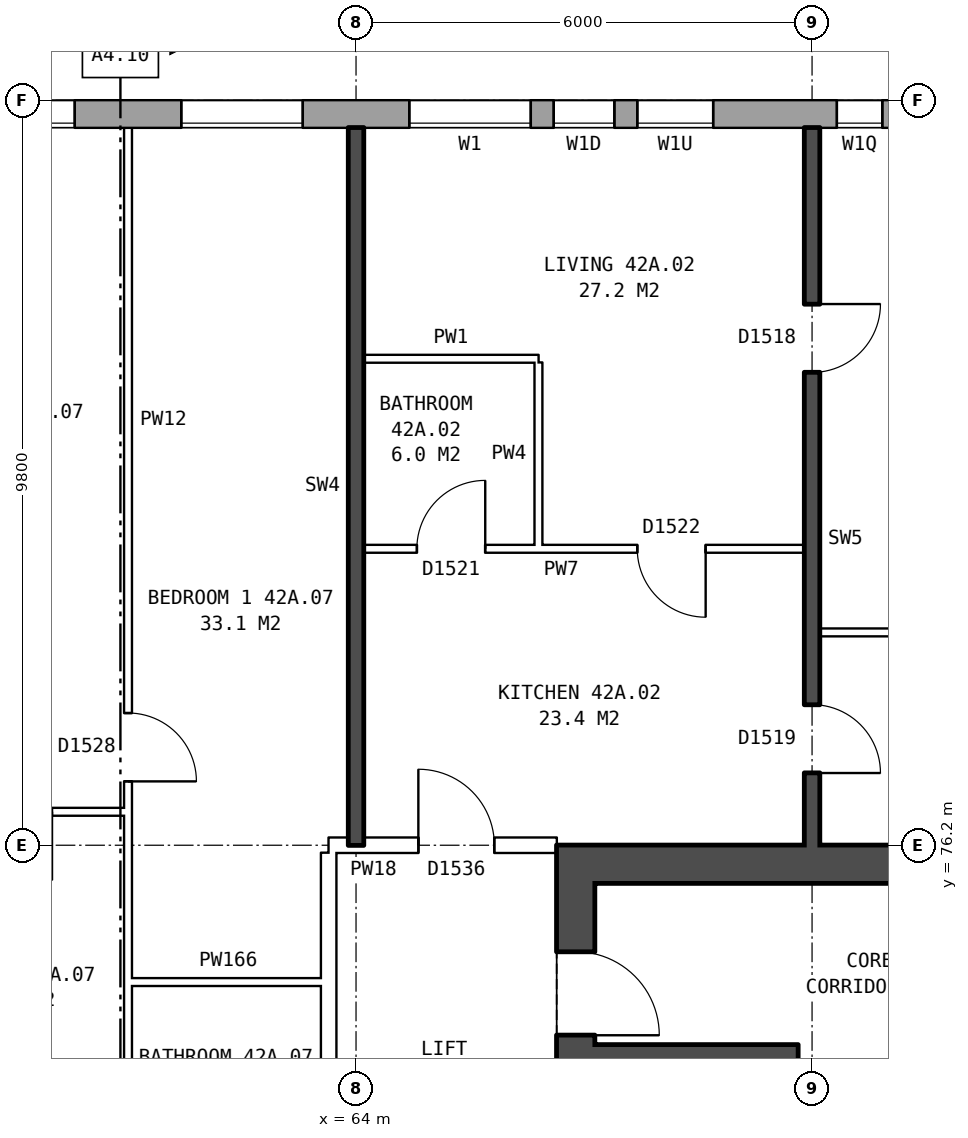
"""IFC4 building model, lengths in metres.
Left out: names, types, materials, properties, quantities, classifications, styles, units other than length and angle.
Written with IfcOpenShell. Run it as: python <this file> out.ifc"""

import sys

from ifc_helpers import new_model, si_unit, direction, frame, frame_2d, origin, place, context, subcontext, project, spatial, rectangle, extrude, element, fill, save


model = new_model("IFC4")
c1 = context("Model", 3, precision=1e-05, world=origin(), true_north=direction((0.0, 1.0)))
c2 = subcontext(c1, "Body", "Model", "MODEL_VIEW")
j1 = project(units=[si_unit("LENGTHUNIT", "METRE"), si_unit("PLANEANGLEUNIT", "RADIAN")], contexts=[c1])
p1 = place(None, origin())
s1 = spatial("IfcSite", under=j1, at=p1, CompositionType="ELEMENT")
p2 = place(p1, origin())
s2 = spatial("IfcBuilding", under=s1, at=p2, CompositionType="ELEMENT")
p3 = place(p2, frame((0.0, 0.0, 151.6)))
s3 = spatial("IfcBuildingStorey", under=s2, at=p3, CompositionType="ELEMENT", Elevation=151.6)
p4 = place(p3, frame((72.925, 85.82, 0.0), z_axis=(0.0, 0.0, 1.0), x_axis=(-1.0, 0.0, 0.0)))
e1 = element("IfcWall", 1, at=p4, inside=s3, PredefinedType="STANDARD", context=c2, shape_type="SweptSolid", body=[
    extrude(rectangle(XDim=41.351, YDim=0.36, at=frame_2d((20.675, 0.0))), origin(), (0.0, 0.0, 1.0), 2.85),
])
p5 = place(p4, frame((0.3, 0.0, 0.8)))
e2 = element("IfcOpeningElement", 2, at=p5, cuts=e1, PredefinedType="OPENING", context=c2, shape_type="SweptSolid", body=[
    extrude(rectangle(XDim=1.4, YDim=1.8, at=frame_2d((0.7, 0.9))), frame((0.0, 0.19, 0.0), z_axis=(0.0, -1.0, 0.0), x_axis=(1.0, 0.0, 0.0)), (0.0, 0.0, 1.0), 0.38),
])
p6 = place(p4, frame((4.225, 0.0, 0.8)))
e3 = element("IfcOpeningElement", 3, at=p6, cuts=e1, PredefinedType="OPENING", context=c2, shape_type="SweptSolid", body=[
    extrude(rectangle(XDim=1.0, YDim=0.9, at=frame_2d((0.5, 0.45))), frame((0.0, 0.19, 0.0), z_axis=(0.0, -1.0, 0.0), x_axis=(1.0, 0.0, 0.0)), (0.0, 0.0, 1.0), 0.38),
])
p7 = place(p4, frame((6.625, 0.0, 0.8)))
e4 = element("IfcOpeningElement", 4, at=p7, cuts=e1, PredefinedType="OPENING", context=c2, shape_type="SweptSolid", body=[
    extrude(rectangle(XDim=1.6, YDim=1.8, at=frame_2d((0.8, 0.9))), frame((0.0, 0.19, 0.0), z_axis=(0.0, -1.0, 0.0), x_axis=(1.0, 0.0, 0.0)), (0.0, 0.0, 1.0), 0.38),
])
p8 = place(p4, frame((9.625, 0.0, 0.8)))
e5 = element("IfcOpeningElement", 5, at=p8, cuts=e1, PredefinedType="OPENING", context=c2, shape_type="SweptSolid", body=[
    extrude(rectangle(XDim=1.6, YDim=1.8, at=frame_2d((0.8, 0.9))), frame((0.0, 0.19, 0.0), z_axis=(0.0, -1.0, 0.0), x_axis=(1.0, 0.0, 0.0)), (0.0, 0.0, 1.0), 0.38),
])
p9 = place(p4, frame((12.625, 0.0, 0.8)))
e6 = element("IfcOpeningElement", 6, at=p9, cuts=e1, PredefinedType="OPENING", context=c2, shape_type="SweptSolid", body=[
    extrude(rectangle(XDim=1.6, YDim=1.8, at=frame_2d((0.8, 0.9))), frame((0.0, 0.19, 0.0), z_axis=(0.0, -1.0, 0.0), x_axis=(1.0, 0.0, 0.0)), (0.0, 0.0, 1.0), 0.38),
])
p10 = place(p4, frame((15.625, 0.0, 0.8)))
e7 = element("IfcOpeningElement", 7, at=p10, cuts=e1, PredefinedType="OPENING", context=c2, shape_type="SweptSolid", body=[
    extrude(rectangle(XDim=1.6, YDim=1.8, at=frame_2d((0.8, 0.9))), frame((0.0, 0.19, 0.0), z_axis=(0.0, -1.0, 0.0), x_axis=(1.0, 0.0, 0.0)), (0.0, 0.0, 1.0), 0.38),
])
p11 = place(p4, frame((18.625, 0.0, 0.8)))
e8 = element("IfcOpeningElement", 8, at=p11, cuts=e1, PredefinedType="OPENING", context=c2, shape_type="SweptSolid", body=[
    extrude(rectangle(XDim=1.6, YDim=1.8, at=frame_2d((0.8, 0.9))), frame((0.0, 0.19, 0.0), z_axis=(0.0, -1.0, 0.0), x_axis=(1.0, 0.0, 0.0)), (0.0, 0.0, 1.0), 0.38),
])
p12 = place(p4, frame((21.625, 0.0, 0.8)))
e9 = element("IfcOpeningElement", 9, at=p12, cuts=e1, PredefinedType="OPENING", context=c2, shape_type="SweptSolid", body=[
    extrude(rectangle(XDim=1.6, YDim=1.8, at=frame_2d((0.8, 0.9))), frame((0.0, 0.19, 0.0), z_axis=(0.0, -1.0, 0.0), x_axis=(1.0, 0.0, 0.0)), (0.0, 0.0, 1.0), 0.38),
])
p13 = place(p4, frame((24.625, 0.0, 0.8)))
e10 = element("IfcOpeningElement", 10, at=p13, cuts=e1, PredefinedType="OPENING", context=c2, shape_type="SweptSolid", body=[
    extrude(rectangle(XDim=1.6, YDim=1.8, at=frame_2d((0.8, 0.9))), frame((0.0, 0.19, 0.0), z_axis=(0.0, -1.0, 0.0), x_axis=(1.0, 0.0, 0.0)), (0.0, 0.0, 1.0), 0.38),
])
p14 = place(p4, frame((27.625, 0.0, 0.8)))
e11 = element("IfcOpeningElement", 11, at=p14, cuts=e1, PredefinedType="OPENING", context=c2, shape_type="SweptSolid", body=[
    extrude(rectangle(XDim=1.6, YDim=1.8, at=frame_2d((0.8, 0.9))), frame((0.0, 0.19, 0.0), z_axis=(0.0, -1.0, 0.0), x_axis=(1.0, 0.0, 0.0)), (0.0, 0.0, 1.0), 0.38),
])
p15 = place(p4, frame((30.625, 0.0, 0.8)))
e12 = element("IfcOpeningElement", 12, at=p15, cuts=e1, PredefinedType="OPENING", context=c2, shape_type="SweptSolid", body=[
    extrude(rectangle(XDim=1.6, YDim=1.8, at=frame_2d((0.8, 0.9))), frame((0.0, 0.19, 0.0), z_axis=(0.0, -1.0, 0.0), x_axis=(1.0, 0.0, 0.0)), (0.0, 0.0, 1.0), 0.38),
])
p16 = place(p4, frame((33.625, 0.0, 0.8)))
e13 = element("IfcOpeningElement", 13, at=p16, cuts=e1, PredefinedType="OPENING", context=c2, shape_type="SweptSolid", body=[
    extrude(rectangle(XDim=1.6, YDim=1.8, at=frame_2d((0.8, 0.9))), frame((0.0, 0.19, 0.0), z_axis=(0.0, -1.0, 0.0), x_axis=(1.0, 0.0, 0.0)), (0.0, 0.0, 1.0), 0.38),
])
p17 = place(p4, frame((35.525, 0.0, 0.8)))
e14 = element("IfcOpeningElement", 14, at=p17, cuts=e1, PredefinedType="OPENING", context=c2, shape_type="SweptSolid", body=[
    extrude(rectangle(XDim=1.2, YDim=1.2, at=frame_2d((0.6, 0.6))), frame((0.0, 0.19, 0.0), z_axis=(0.0, -1.0, 0.0), x_axis=(1.0, 0.0, 0.0)), (0.0, 0.0, 1.0), 0.38),
])
p18 = place(p4, frame((2.0, 0.0, 1.4)))
e15 = element("IfcOpeningElement", 15, at=p18, cuts=e1, PredefinedType="OPENING", context=c2, shape_type="SweptSolid", body=[
    extrude(rectangle(XDim=0.6, YDim=1.2, at=frame_2d((0.3, 0.6))), frame((0.0, 0.19, 0.0), z_axis=(0.0, -1.0, 0.0), x_axis=(1.0, 0.0, 0.0)), (0.0, 0.0, 1.0), 0.38),
])
p19 = place(p4, frame((5.525, 0.0, 0.8)))
e16 = element("IfcOpeningElement", 16, at=p19, cuts=e1, PredefinedType="OPENING", context=c2, shape_type="SweptSolid", body=[
    extrude(rectangle(XDim=0.8, YDim=1.8, at=frame_2d((0.4, 0.9))), frame((0.0, 0.19, 0.0), z_axis=(0.0, -1.0, 0.0), x_axis=(1.0, 0.0, 0.0)), (0.0, 0.0, 1.0), 0.38),
])
p20 = place(p3, frame((66.89, 63.8, 0.0), z_axis=(0.0, 0.0, 1.0), x_axis=(0.0, 1.0, 0.0)))
e17 = element("IfcWall", 17, at=p20, inside=s3, PredefinedType="SHEAR", context=c2, shape_type="SweptSolid", body=[
    extrude(rectangle(XDim=12.4, YDim=0.5, at=frame_2d((6.2, 0.0))), origin(), (0.0, 0.0, 1.0), 2.85),
])
p21 = place(p20, frame((1.325, 0.0, 0.0)))
e18 = element("IfcOpeningElement", 18, at=p21, cuts=e17, PredefinedType="OPENING", context=c2, shape_type="SweptSolid", body=[
    extrude(rectangle(XDim=1.1, YDim=2.1, at=frame_2d((0.55, 1.05))), frame((0.0, 0.26, 0.0), z_axis=(0.0, -1.0, 0.0), x_axis=(1.0, 0.0, 0.0)), (0.0, 0.0, 1.0), 0.52),
])
p22 = place(p20, frame((3.6, 0.0, 0.0)))
e19 = element("IfcOpeningElement", 19, at=p22, cuts=e17, PredefinedType="OPENING", context=c2, shape_type="SweptSolid", body=[
    extrude(rectangle(XDim=1.1, YDim=2.1, at=frame_2d((0.55, 1.05))), frame((0.0, 0.26, 0.0), z_axis=(0.0, -1.0, 0.0), x_axis=(1.0, 0.0, 0.0)), (0.0, 0.0, 1.0), 0.52),
])
p23 = place(p20, frame((5.8, 0.0, 0.0)))
e20 = element("IfcOpeningElement", 20, at=p23, cuts=e17, PredefinedType="OPENING", context=c2, shape_type="SweptSolid", body=[
    extrude(rectangle(XDim=1.1, YDim=2.1, at=frame_2d((0.55, 1.05))), frame((0.0, 0.26, 0.0), z_axis=(0.0, -1.0, 0.0), x_axis=(1.0, 0.0, 0.0)), (0.0, 0.0, 1.0), 0.52),
])
p24 = place(p20, frame((8.0, 0.0, 0.0)))
e21 = element("IfcOpeningElement", 21, at=p24, cuts=e17, PredefinedType="OPENING", context=c2, shape_type="SweptSolid", body=[
    extrude(rectangle(XDim=1.1, YDim=2.1, at=frame_2d((0.55, 1.05))), frame((0.0, 0.26, 0.0), z_axis=(0.0, -1.0, 0.0), x_axis=(1.0, 0.0, 0.0)), (0.0, 0.0, 1.0), 0.52),
])
p25 = place(p20, frame((9.9, 0.0, 0.0)))
e22 = element("IfcOpeningElement", 22, at=p25, cuts=e17, PredefinedType="OPENING", context=c2, shape_type="SweptSolid", body=[
    extrude(rectangle(XDim=1.1, YDim=2.1, at=frame_2d((0.55, 1.05))), frame((0.0, 0.26, 0.0), z_axis=(0.0, -1.0, 0.0), x_axis=(1.0, 0.0, 0.0)), (0.0, 0.0, 1.0), 0.52),
])
p26 = place(p3, frame((67.14, 75.95, 0.0), z_axis=(0.0, 0.0, 1.0), x_axis=(1.0, 0.0, 0.0)))
e23 = element("IfcWall", 23, at=p26, inside=s3, PredefinedType="SHEAR", context=c2, shape_type="SweptSolid", body=[
    extrude(rectangle(XDim=8.0, YDim=0.5, at=frame_2d((4.0, 0.0))), origin(), (0.0, 0.0, 1.0), 2.85),
])
p27 = place(p3, frame((67.14, 73.45, 0.0), z_axis=(0.0, 0.0, 1.0), x_axis=(1.0, 0.0, 0.0)))
e24 = element("IfcWall", 24, at=p27, inside=s3, PredefinedType="SHEAR", context=c2, shape_type="SweptSolid", body=[
    extrude(rectangle(XDim=2.425, YDim=0.25, at=frame_2d((1.212, 0.0))), origin(), (0.0, 0.0, 1.0), 2.85),
])
p28 = place(p3, frame((69.69, 66.975, 0.0), z_axis=(0.0, 0.0, 1.0), x_axis=(0.0, 1.0, 0.0)))
e25 = element("IfcWall", 25, at=p28, inside=s3, PredefinedType="SHEAR", context=c2, shape_type="SweptSolid", body=[
    extrude(rectangle(XDim=6.6, YDim=0.25, at=frame_2d((3.3, 0.0))), origin(), (0.0, 0.0, 1.0), 2.85),
])
p29 = place(p3, frame((63.64, 63.9, 0.0), z_axis=(0.0, 0.0, 1.0), x_axis=(0.0, 1.0, 0.0)))
e26 = element("IfcWall", 26, at=p29, inside=s3, PredefinedType="PARTITIONING", context=c2, shape_type="SweptSolid", body=[
    extrude(rectangle(XDim=12.2, YDim=0.2, at=frame_2d((6.1, 0.0))), origin(), (0.0, 0.0, 1.0), 2.85),
])
p30 = place(p29, frame((5.1, 0.0, 0.0)))
e27 = element("IfcOpeningElement", 27, at=p30, cuts=e26, PredefinedType="OPENING", context=c2, shape_type="SweptSolid", body=[
    extrude(rectangle(XDim=2.0, YDim=2.1, at=frame_2d((1.0, 1.05))), frame((0.0, 0.11, 0.0), z_axis=(0.0, -1.0, 0.0), x_axis=(1.0, 0.0, 0.0)), (0.0, 0.0, 1.0), 0.22),
])
p31 = place(p3, frame((61.0, 74.4, 0.0), z_axis=(0.0, 0.0, 1.0), x_axis=(1.0, 0.0, 0.0)))
e28 = element("IfcWall", 28, at=p31, inside=s3, PredefinedType="PARTITIONING", context=c2, shape_type="SweptSolid", body=[
    extrude(rectangle(XDim=2.64, YDim=0.1, at=frame_2d((1.32, 0.0))), origin(), (0.0, 0.0, 1.0), 2.85),
])
p32 = place(p3, frame((63.64, 76.2, 0.0), z_axis=(0.0, 0.0, 1.0), x_axis=(1.0, 0.0, 0.0)))
e29 = element("IfcWall", 29, at=p32, inside=s3, PredefinedType="PARTITIONING", context=c2, shape_type="SweptSolid", body=[
    extrude(rectangle(XDim=3.0, YDim=0.2, at=frame_2d((1.5, 0.0))), origin(), (0.0, 0.0, 1.0), 2.85),
])
p33 = place(p32, frame((1.18, 0.0, 0.0)))
e30 = element("IfcOpeningElement", 30, at=p33, cuts=e29, PredefinedType="OPENING", context=c2, shape_type="SweptSolid", body=[
    extrude(rectangle(XDim=1.0, YDim=2.1, at=frame_2d((0.5, 1.05))), frame((0.0, 0.11, 0.0), z_axis=(0.0, -1.0, 0.0), x_axis=(1.0, 0.0, 0.0)), (0.0, 0.0, 1.0), 0.22),
])
p34 = place(p3, frame((58.1, 76.64, 0.0), z_axis=(0.0, 0.0, 1.0), x_axis=(1.0, 0.0, 0.0)))
e31 = element("IfcWall", 31, at=p34, inside=s3, PredefinedType="PARTITIONING", context=c2, shape_type="SweptSolid", body=[
    extrude(rectangle(XDim=2.9, YDim=0.1, at=frame_2d((1.45, 0.0))), origin(), (0.0, 0.0, 1.0), 2.85),
])
p35 = place(p34, frame((1.0, 0.0, 0.0)))
e32 = element("IfcOpeningElement", 32, at=p35, cuts=e31, PredefinedType="OPENING", context=c2, shape_type="SweptSolid", body=[
    extrude(rectangle(XDim=0.9, YDim=2.1, at=frame_2d((0.45, 1.05))), frame((0.0, 0.06, 0.0), z_axis=(0.0, -1.0, 0.0), x_axis=(1.0, 0.0, 0.0)), (0.0, 0.0, 1.0), 0.12),
])
p36 = place(p3, frame((70.1, 79.0, 0.0), z_axis=(0.0, 0.0, 1.0), x_axis=(1.0, 0.0, 0.0)))
e33 = element("IfcWall", 33, at=p36, inside=s3, PredefinedType="PARTITIONING", context=c2, shape_type="SweptSolid", body=[
    extrude(rectangle(XDim=5.54, YDim=0.1, at=frame_2d((2.77, 0.0))), origin(), (0.0, 0.0, 1.0), 2.85),
])
p37 = place(p3, frame((64.1, 80.1, 0.0), z_axis=(0.0, 0.0, 1.0), x_axis=(1.0, 0.0, 0.0)))
e34 = element("IfcWall", 34, at=p37, inside=s3, PredefinedType="PARTITIONING", context=c2, shape_type="SweptSolid", body=[
    extrude(rectangle(XDim=5.8, YDim=0.1, at=frame_2d((2.9, 0.0))), origin(), (0.0, 0.0, 1.0), 2.85),
])
p38 = place(p37, frame((3.6, 0.0, 0.0)))
e35 = element("IfcOpeningElement", 35, at=p38, cuts=e34, PredefinedType="OPENING", context=c2, shape_type="SweptSolid", body=[
    extrude(rectangle(XDim=0.9, YDim=2.1, at=frame_2d((0.45, 1.05))), frame((0.0, 0.06, 0.0), z_axis=(0.0, -1.0, 0.0), x_axis=(1.0, 0.0, 0.0)), (0.0, 0.0, 1.0), 0.12),
])
p39 = place(p37, frame((0.7, 0.0, 0.0)))
e36 = element("IfcOpeningElement", 36, at=p39, cuts=e34, PredefinedType="OPENING", context=c2, shape_type="SweptSolid", body=[
    extrude(rectangle(XDim=0.9, YDim=2.1, at=frame_2d((0.45, 1.05))), frame((0.0, 0.06, 0.0), z_axis=(0.0, -1.0, 0.0), x_axis=(1.0, 0.0, 0.0)), (0.0, 0.0, 1.0), 0.12),
])
p40 = place(p3, frame((64.1, 82.6, 0.0), z_axis=(0.0, 0.0, 1.0), x_axis=(1.0, 0.0, 0.0)))
e37 = element("IfcWall", 37, at=p40, inside=s3, PredefinedType="PARTITIONING", context=c2, shape_type="SweptSolid", body=[
    extrude(rectangle(XDim=2.3, YDim=0.1, at=frame_2d((1.15, 0.0))), origin(), (0.0, 0.0, 1.0), 2.85),
])
p41 = place(p3, frame((61.0, 71.3, 0.0), z_axis=(0.0, 0.0, 1.0), x_axis=(0.0, 1.0, 0.0)))
e38 = element("IfcWall", 38, at=p41, inside=s3, PredefinedType="PARTITIONING", context=c2, shape_type="SweptSolid", body=[
    extrude(rectangle(XDim=14.34, YDim=0.1, at=frame_2d((7.17, 0.0))), origin(), (0.0, 0.0, 1.0), 2.85),
])
p42 = place(p41, frame((5.74, 0.0, 0.0)))
e39 = element("IfcOpeningElement", 39, at=p42, cuts=e38, PredefinedType="OPENING", context=c2, shape_type="SweptSolid", body=[
    extrude(rectangle(XDim=0.9, YDim=2.1, at=frame_2d((0.45, 1.05))), frame((0.0, 0.06, 0.0), z_axis=(0.0, -1.0, 0.0), x_axis=(1.0, 0.0, 0.0)), (0.0, 0.0, 1.0), 0.12),
])
p43 = place(p41, frame((0.4, 0.0, 0.0)))
e40 = element("IfcOpeningElement", 40, at=p43, cuts=e38, PredefinedType="OPENING", context=c2, shape_type="SweptSolid", body=[
    extrude(rectangle(XDim=0.9, YDim=2.1, at=frame_2d((0.45, 1.05))), frame((0.0, 0.06, 0.0), z_axis=(0.0, -1.0, 0.0), x_axis=(1.0, 0.0, 0.0)), (0.0, 0.0, 1.0), 0.12),
])
p44 = place(p3, frame((64.0, 76.2, 0.0), z_axis=(0.0, 0.0, 1.0), x_axis=(0.0, 1.0, 0.0)))
e41 = element("IfcWall", 41, at=p44, inside=s3, PredefinedType="SOLIDWALL", context=c2, shape_type="SweptSolid", body=[
    extrude(rectangle(XDim=9.44, YDim=0.2, at=frame_2d((4.72, 0.0))), origin(), (0.0, 0.0, 1.0), 2.85),
])
p45 = place(p3, frame((66.4, 80.15, 0.0), z_axis=(0.0, 0.0, 1.0), x_axis=(0.0, 1.0, 0.0)))
e42 = element("IfcWall", 42, at=p45, inside=s3, PredefinedType="PARTITIONING", context=c2, shape_type="SweptSolid", body=[
    extrude(rectangle(XDim=2.4, YDim=0.1, at=frame_2d((1.2, 0.0))), origin(), (0.0, 0.0, 1.0), 2.85),
])
p46 = place(p3, frame((70.0, 76.2, 0.0), z_axis=(0.0, 0.0, 1.0), x_axis=(0.0, 1.0, 0.0)))
e43 = element("IfcWall", 43, at=p46, inside=s3, PredefinedType="SOLIDWALL", context=c2, shape_type="SweptSolid", body=[
    extrude(rectangle(XDim=9.44, YDim=0.2, at=frame_2d((4.72, 0.0))), origin(), (0.0, 0.0, 1.0), 2.85),
])
p47 = place(p46, frame((6.22, 0.0, 0.0)))
e44 = element("IfcOpeningElement", 44, at=p47, cuts=e43, PredefinedType="OPENING", context=c2, shape_type="SweptSolid", body=[
    extrude(rectangle(XDim=0.9, YDim=2.1, at=frame_2d((0.45, 1.05))), frame((0.0, 0.11, 0.0), z_axis=(0.0, -1.0, 0.0), x_axis=(1.0, 0.0, 0.0)), (0.0, 0.0, 1.0), 0.22),
])
p48 = place(p46, frame((0.95, 0.0, 0.0)))
e45 = element("IfcOpeningElement", 45, at=p48, cuts=e43, PredefinedType="OPENING", context=c2, shape_type="SweptSolid", body=[
    extrude(rectangle(XDim=0.9, YDim=2.1, at=frame_2d((0.45, 1.05))), frame((0.0, 0.11, 0.0), z_axis=(0.0, -1.0, 0.0), x_axis=(1.0, 0.0, 0.0)), (0.0, 0.0, 1.0), 0.22),
])
p49 = place(p6, origin())
e46 = element("IfcWindow", 46, at=p49, inside=s3, PartitioningType="SINGLE_PANEL", PredefinedType="WINDOW", context=c2, shape_type="SweptSolid", body=[
    extrude(rectangle(XDim=1.0, YDim=0.9, at=frame_2d((0.5, 0.45))), frame((0.0, 0.15, 0.0), z_axis=(0.0, -1.0, 0.0), x_axis=(1.0, 0.0, 0.0)), (0.0, 0.0, 1.0), 0.06),
])
fill(e3, e46)
p50 = place(p7, origin())
e47 = element("IfcWindow", 47, at=p50, inside=s3, PartitioningType="SINGLE_PANEL", PredefinedType="WINDOW", context=c2, shape_type="SweptSolid", body=[
    extrude(rectangle(XDim=1.6, YDim=1.8, at=frame_2d((0.8, 0.9))), frame((0.0, 0.15, 0.0), z_axis=(0.0, -1.0, 0.0), x_axis=(1.0, 0.0, 0.0)), (0.0, 0.0, 1.0), 0.06),
])
fill(e4, e47)
p51 = place(p8, origin())
e48 = element("IfcWindow", 48, at=p51, inside=s3, PartitioningType="SINGLE_PANEL", PredefinedType="WINDOW", context=c2, shape_type="SweptSolid", body=[
    extrude(rectangle(XDim=1.6, YDim=1.8, at=frame_2d((0.8, 0.9))), frame((0.0, 0.15, 0.0), z_axis=(0.0, -1.0, 0.0), x_axis=(1.0, 0.0, 0.0)), (0.0, 0.0, 1.0), 0.06),
])
fill(e5, e48)
p52 = place(p9, origin())
e49 = element("IfcWindow", 49, at=p52, inside=s3, PartitioningType="SINGLE_PANEL", PredefinedType="WINDOW", context=c2, shape_type="SweptSolid", body=[
    extrude(rectangle(XDim=1.6, YDim=1.8, at=frame_2d((0.8, 0.9))), frame((0.0, 0.15, 0.0), z_axis=(0.0, -1.0, 0.0), x_axis=(1.0, 0.0, 0.0)), (0.0, 0.0, 1.0), 0.06),
])
fill(e6, e49)
p53 = place(p25, frame((1.1, 0.0, 0.0), z_axis=(0.0, 0.0, 1.0), x_axis=(-1.0, 0.0, 0.0)))
e50 = element("IfcDoor", 50, at=p53, inside=s3, OperationType="SINGLE_SWING_RIGHT", PredefinedType="DOOR", context=c2, shape_type="SweptSolid", body=[
    extrude(rectangle(XDim=1.1, YDim=2.1, at=frame_2d((0.55, 1.05))), frame((0.0, 0.235, 0.0), z_axis=(0.0, -1.0, 0.0), x_axis=(1.0, 0.0, 0.0)), (0.0, 0.0, 1.0), 0.05),
])
fill(e22, e50)
p54 = place(p47, frame((0.9, 0.0, 0.0), z_axis=(0.0, 0.0, 1.0), x_axis=(-1.0, 0.0, 0.0)))
e51 = element("IfcDoor", 51, at=p54, inside=s3, OperationType="SINGLE_SWING_LEFT", PredefinedType="DOOR", context=c2, shape_type="SweptSolid", body=[
    extrude(rectangle(XDim=0.9, YDim=2.1, at=frame_2d((0.45, 1.05))), frame((0.0, 0.025, 0.0), z_axis=(0.0, -1.0, 0.0), x_axis=(1.0, 0.0, 0.0)), (0.0, 0.0, 1.0), 0.05),
])
fill(e44, e51)
p55 = place(p48, frame((0.9, 0.0, 0.0), z_axis=(0.0, 0.0, 1.0), x_axis=(-1.0, 0.0, 0.0)))
e52 = element("IfcDoor", 52, at=p55, inside=s3, OperationType="SINGLE_SWING_RIGHT", PredefinedType="DOOR", context=c2, shape_type="SweptSolid", body=[
    extrude(rectangle(XDim=0.9, YDim=2.1, at=frame_2d((0.45, 1.05))), frame((0.0, 0.025, 0.0), z_axis=(0.0, -1.0, 0.0), x_axis=(1.0, 0.0, 0.0)), (0.0, 0.0, 1.0), 0.05),
])
fill(e45, e52)
p56 = place(p33, origin())
e53 = element("IfcDoor", 53, at=p56, inside=s3, OperationType="SINGLE_SWING_LEFT", PredefinedType="DOOR", context=c2, shape_type="SweptSolid", body=[
    extrude(rectangle(XDim=1.0, YDim=2.1, at=frame_2d((0.5, 1.05))), frame((0.0, 0.025, 0.0), z_axis=(0.0, -1.0, 0.0), x_axis=(1.0, 0.0, 0.0)), (0.0, 0.0, 1.0), 0.05),
])
fill(e30, e53)
p57 = place(p38, frame((0.9, 0.0, 0.0), z_axis=(0.0, 0.0, 1.0), x_axis=(-1.0, 0.0, 0.0)))
e54 = element("IfcDoor", 54, at=p57, inside=s3, OperationType="SINGLE_SWING_LEFT", PredefinedType="DOOR", context=c2, shape_type="SweptSolid", body=[
    extrude(rectangle(XDim=0.9, YDim=2.1, at=frame_2d((0.45, 1.05))), frame((0.0, 0.025, 0.0), z_axis=(0.0, -1.0, 0.0), x_axis=(1.0, 0.0, 0.0)), (0.0, 0.0, 1.0), 0.05),
])
fill(e35, e54)
p58 = place(p39, origin())
e55 = element("IfcDoor", 55, at=p58, inside=s3, OperationType="SINGLE_SWING_RIGHT", PredefinedType="DOOR", context=c2, shape_type="SweptSolid", body=[
    extrude(rectangle(XDim=0.9, YDim=2.1, at=frame_2d((0.45, 1.05))), frame((0.0, 0.025, 0.0), z_axis=(0.0, -1.0, 0.0), x_axis=(1.0, 0.0, 0.0)), (0.0, 0.0, 1.0), 0.05),
])
fill(e36, e55)
p59 = place(p42, frame((0.9, 0.0, 0.0), z_axis=(0.0, 0.0, 1.0), x_axis=(-1.0, 0.0, 0.0)))
e56 = element("IfcDoor", 56, at=p59, inside=s3, OperationType="SINGLE_SWING_RIGHT", PredefinedType="DOOR", context=c2, shape_type="SweptSolid", body=[
    extrude(rectangle(XDim=0.9, YDim=2.1, at=frame_2d((0.45, 1.05))), frame((0.0, 0.025, 0.0), z_axis=(0.0, -1.0, 0.0), x_axis=(1.0, 0.0, 0.0)), (0.0, 0.0, 1.0), 0.05),
])
fill(e39, e56)
p60 = place(p18, origin())
e57 = element("IfcWindow", 57, at=p60, inside=s3, PartitioningType="SINGLE_PANEL", PredefinedType="WINDOW", context=c2, shape_type="SweptSolid", body=[
    extrude(rectangle(XDim=0.6, YDim=1.2, at=frame_2d((0.3, 0.6))), frame((0.0, 0.15, 0.0), z_axis=(0.0, -1.0, 0.0), x_axis=(1.0, 0.0, 0.0)), (0.0, 0.0, 1.0), 0.06),
])
fill(e15, e57)
p61 = place(p19, origin())
e58 = element("IfcWindow", 58, at=p61, inside=s3, PartitioningType="SINGLE_PANEL", PredefinedType="WINDOW", context=c2, shape_type="SweptSolid", body=[
    extrude(rectangle(XDim=0.8, YDim=1.8, at=frame_2d((0.4, 0.9))), frame((0.0, 0.15, 0.0), z_axis=(0.0, -1.0, 0.0), x_axis=(1.0, 0.0, 0.0)), (0.0, 0.0, 1.0), 0.06),
])
fill(e16, e58)
save(model, sys.argv[1])
